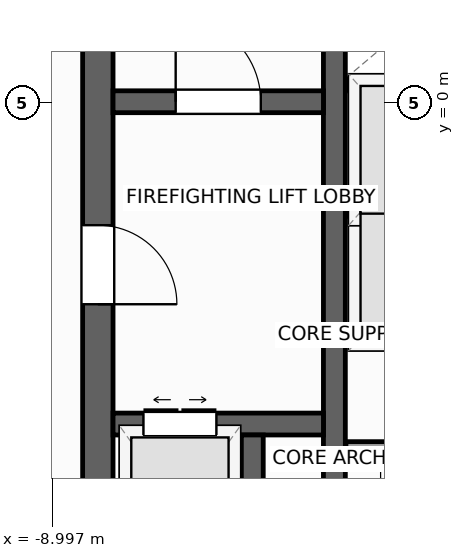
"""IFC4 building model, lengths in metres.
Left out: names, types, materials, properties, quantities, classifications, styles, units other than length and angle.
Written with IfcOpenShell. Run it as: python <this file> out.ifc"""

import sys

from ifc_helpers import new_model, si_unit, direction, frame, frame_2d, origin, place, context, subcontext, project, spatial, rectangle, extrude, source, transform, mapped, element, fill, save


model = new_model("IFC4")
c1 = context("Model", 3, precision=1e-05, world=origin(), true_north=direction((0.0, 1.0)))
c2 = subcontext(c1, "Body", "Model", "MODEL_VIEW")
j1 = project(units=[si_unit("LENGTHUNIT", "METRE"), si_unit("PLANEANGLEUNIT", "RADIAN")], contexts=[c1])
p1 = place(None, origin())
s1 = spatial("IfcSite", under=j1, at=p1, CompositionType="ELEMENT")
p2 = place(p1, origin())
s2 = spatial("IfcBuilding", under=s1, at=p2, CompositionType="ELEMENT")
p3 = place(p2, frame((0.0, 0.0, 221.2)))
s3 = spatial("IfcBuildingStorey", under=s2, at=p3, CompositionType="ELEMENT", Elevation=221.2)
p4 = place(p3, frame((-8.25, -8.0, 0.0), z_axis=(0.0, 0.0, 1.0), x_axis=(0.0, 1.0, 0.0)))
e1 = element("IfcWall", 1, at=p4, inside=s3, PredefinedType="SHEAR", context=c2, shape_type="SweptSolid", body=[
    extrude(rectangle(XDim=16.0, YDim=0.5, at=frame_2d((8.0, 0.0))), origin(), (0.0, 0.0, 1.0), 3.9),
])
p5 = place(p4, frame((4.69, 0.0, 0.0)))
e2 = element("IfcOpeningElement", 2, at=p5, cuts=e1, PredefinedType="OPENING", context=c2, shape_type="SweptSolid", body=[
    extrude(rectangle(XDim=1.3, YDim=2.2, at=frame_2d((0.65, 1.1))), frame((0.0, 0.26, 0.0), z_axis=(0.0, -1.0, 0.0), x_axis=(1.0, 0.0, 0.0)), (0.0, 0.0, 1.0), 0.52),
])
p6 = place(p3, frame((-4.36, -8.0, 0.0), z_axis=(0.0, 0.0, 1.0), x_axis=(0.0, 1.0, 0.0)))
e3 = element("IfcWall", 3, at=p6, inside=s3, PredefinedType="SHEAR", context=c2, shape_type="SweptSolid", body=[
    extrude(rectangle(XDim=16.0, YDim=0.36, at=frame_2d((8.0, 0.0))), origin(), (0.0, 0.0, 1.0), 3.9),
])
p7 = place(p3, frame((-8.0, 0.02, 0.0), z_axis=(0.0, 0.0, 1.0), x_axis=(1.0, 0.0, 0.0)))
e4 = element("IfcWall", 4, at=p7, inside=s3, PredefinedType="SHEAR", context=c2, shape_type="SweptSolid", body=[
    extrude(rectangle(XDim=3.46, YDim=0.36, at=frame_2d((1.73, 0.0))), origin(), (0.0, 0.0, 1.0), 3.9),
])
p8 = place(p7, frame((1.03, 0.0, 0.0)))
e5 = element("IfcOpeningElement", 5, at=p8, cuts=e4, PredefinedType="OPENING", context=c2, shape_type="SweptSolid", body=[
    extrude(rectangle(XDim=1.4, YDim=2.2, at=frame_2d((0.7, 1.1))), frame((0.0, 0.19, 0.0), z_axis=(0.0, -1.0, 0.0), x_axis=(1.0, 0.0, 0.0)), (0.0, 0.0, 1.0), 0.38),
])
p9 = place(p3, frame((-8.0, -5.28, 0.0), z_axis=(0.0, 0.0, 1.0), x_axis=(1.0, 0.0, 0.0)))
e6 = element("IfcWall", 6, at=p9, inside=s3, PredefinedType="SHEAR", context=c2, shape_type="SweptSolid", body=[
    extrude(rectangle(XDim=3.46, YDim=0.36, at=frame_2d((1.73, 0.0))), origin(), (0.0, 0.0, 1.0), 3.9),
])
p10 = place(p9, frame((0.5, 0.0, 0.0)))
e7 = element("IfcOpeningElement", 7, at=p10, cuts=e6, PredefinedType="OPENING", context=c2, shape_type="SweptSolid", body=[
    extrude(rectangle(XDim=1.2, YDim=2.25, at=frame_2d((0.6, 1.125))), frame((0.0, 0.19, 0.0), z_axis=(0.0, -1.0, 0.0), x_axis=(1.0, 0.0, 0.0)), (0.0, 0.0, 1.0), 0.38),
])
p11 = place(p3, frame((-5.71, -8.0, 0.0), z_axis=(0.0, 0.0, 1.0), x_axis=(0.0, 1.0, 0.0)))
e8 = element("IfcWall", 8, at=p11, inside=s3, PredefinedType="SHEAR", context=c2, shape_type="SweptSolid", body=[
    extrude(rectangle(XDim=2.54, YDim=0.36, at=frame_2d((1.27, 0.0))), origin(), (0.0, 0.0, 1.0), 3.9),
])
p12 = place(p3, frame((-6.733, 29.154, 0.0), z_axis=(0.0, 0.0, 1.0), x_axis=(-0.629325378072, -0.77714192302, 0.0)))
e9 = element("IfcWall", 9, at=p12, inside=s3, PredefinedType="STANDARD", context=c2, shape_type="SweptSolid", body=[
    extrude(rectangle(XDim=36.84, YDim=0.34, at=frame_2d((18.42, 0.0))), origin(), (0.0, 0.0, 1.0), 2.96),
])
p13 = place(p12, frame((23.495, 0.0, 0.0)))
e10 = element("IfcOpeningElement", 10, at=p13, cuts=e9, PredefinedType="OPENING", context=c2, shape_type="SweptSolid", body=[
    extrude(rectangle(XDim=1.05, YDim=2.25, at=frame_2d((0.525, 1.125))), frame((0.0, 0.18, 0.0), z_axis=(0.0, -1.0, 0.0), x_axis=(1.0, 0.0, 0.0)), (0.0, 0.0, 1.0), 0.36),
])
p14 = place(p12, frame((3.721, 0.0, 0.48)))
e11 = element("IfcOpeningElement", 11, at=p14, cuts=e9, PredefinedType="OPENING", context=c2, shape_type="SweptSolid", body=[
    extrude(rectangle(XDim=1.4, YDim=2.4, at=frame_2d((0.7, 1.2))), frame((0.0, 0.18, 0.0), z_axis=(0.0, -1.0, 0.0), x_axis=(1.0, 0.0, 0.0)), (0.0, 0.0, 1.0), 0.36),
])
p15 = place(p12, frame((9.809, 0.0, 0.58)))
e12 = element("IfcOpeningElement", 12, at=p15, cuts=e9, PredefinedType="OPENING", context=c2, shape_type="SweptSolid", body=[
    extrude(rectangle(XDim=1.75, YDim=2.3, at=frame_2d((0.875, 1.15))), frame((0.0, 0.18, 0.0), z_axis=(0.0, -1.0, 0.0), x_axis=(1.0, 0.0, 0.0)), (0.0, 0.0, 1.0), 0.36),
])
p16 = place(p12, frame((16.058, 0.0, 0.58)))
e13 = element("IfcOpeningElement", 13, at=p16, cuts=e9, PredefinedType="OPENING", context=c2, shape_type="SweptSolid", body=[
    extrude(rectangle(XDim=1.75, YDim=2.3, at=frame_2d((0.875, 1.15))), frame((0.0, 0.18, 0.0), z_axis=(0.0, -1.0, 0.0), x_axis=(1.0, 0.0, 0.0)), (0.0, 0.0, 1.0), 0.36),
])
p17 = place(p12, frame((25.676, 0.0, 0.58)))
e14 = element("IfcOpeningElement", 14, at=p17, cuts=e9, PredefinedType="OPENING", context=c2, shape_type="SweptSolid", body=[
    extrude(rectangle(XDim=1.75, YDim=2.3, at=frame_2d((0.875, 1.15))), frame((0.0, 0.18, 0.0), z_axis=(0.0, -1.0, 0.0), x_axis=(1.0, 0.0, 0.0)), (0.0, 0.0, 1.0), 0.36),
])
p18 = place(p12, frame((30.232, 0.0, 0.48)))
e15 = element("IfcOpeningElement", 15, at=p18, cuts=e9, PredefinedType="OPENING", context=c2, shape_type="SweptSolid", body=[
    extrude(rectangle(XDim=1.4, YDim=2.4, at=frame_2d((0.7, 1.2))), frame((0.0, 0.18, 0.0), z_axis=(0.0, -1.0, 0.0), x_axis=(1.0, 0.0, 0.0)), (0.0, 0.0, 1.0), 0.36),
])
for number, where, z_axis, x_axis in (
    (16, (-4.17, -3.9, 0.0), (0.0, 0.0, 1.0), (1.0, 0.0, 0.0)),
    (17, (-4.17, 0.3, 0.0), (0.0, 0.0, 1.0), (1.0, 0.0, 0.0)),
):
    element("IfcWall", number, at=place(p3, frame(where, z_axis=z_axis, x_axis=x_axis)), inside=s3, PredefinedType="PARTITIONING", context=c2, shape_type="SweptSolid", body=[
        extrude(rectangle(XDim=2.28, YDim=0.18, at=frame_2d((1.14, 0.0))), origin(), (0.0, 0.0, 1.0), 3.66),
    ])
p19 = place(p3, frame((-4.16, -1.8, 0.0), z_axis=(0.0, 0.0, 1.0), x_axis=(1.0, 0.0, 0.0)))
e18 = element("IfcWall", 18, at=p19, inside=s3, PredefinedType="PARTITIONING", context=c2, shape_type="SweptSolid", body=[
    extrude(rectangle(XDim=2.26, YDim=0.12, at=frame_2d((1.13, 0.0))), origin(), (0.0, 0.0, 1.0), 3.66),
])
p20 = place(p3, frame((-4.17, -5.65, 0.0), z_axis=(0.0, 0.0, 1.0), x_axis=(1.0, 0.0, 0.0)))
e19 = element("IfcWall", 19, at=p20, inside=s3, PredefinedType="PARTITIONING", context=c2, shape_type="SweptSolid", body=[
    extrude(rectangle(XDim=2.28, YDim=0.16, at=frame_2d((1.14, 0.0))), origin(), (0.0, 0.0, 1.0), 3.66),
])
m1 = source(origin(), c2, "Body", "SweptSolid", [
    extrude(rectangle(XDim=1.4, YDim=2.2, at=frame_2d((0.7, 1.1))), frame((0.0, 0.025, 0.0), z_axis=(0.0, -1.0, 0.0), x_axis=(1.0, 0.0, 0.0)), (0.0, 0.0, 1.0), 0.05),
])
p21 = place(p8, origin())
e20 = element("IfcDoor", 20, at=p21, inside=s3, OperationType="SINGLE_SWING_LEFT", PredefinedType="DOOR", context=c2, shape_type="MappedRepresentation", body=[
    mapped(m1, transform((0.0, 0.0, 0.0), scale=1.0)),
])
fill(e5, e20)
m2 = source(origin(), c2, "Body", "SweptSolid", [
    extrude(rectangle(XDim=1.3, YDim=2.2, at=frame_2d((0.65, 1.1))), frame((0.0, 0.025, 0.0), z_axis=(0.0, -1.0, 0.0), x_axis=(1.0, 0.0, 0.0)), (0.0, 0.0, 1.0), 0.05),
])
p22 = place(p5, frame((1.3, 0.0, 0.0), z_axis=(0.0, 0.0, 1.0), x_axis=(-1.0, 0.0, 0.0)))
e21 = element("IfcDoor", 21, at=p22, inside=s3, OperationType="SINGLE_SWING_LEFT", PredefinedType="DOOR", context=c2, shape_type="MappedRepresentation", body=[
    mapped(m2, transform((0.0, 0.0, 0.0), scale=1.0)),
])
fill(e2, e21)
m3 = source(origin(), c2, "Body", "SweptSolid", [
    extrude(rectangle(XDim=1.2, YDim=2.25, at=frame_2d((0.6, 1.125))), frame((0.0, 0.025, 0.0), z_axis=(0.0, -1.0, 0.0), x_axis=(1.0, 0.0, 0.0)), (0.0, 0.0, 1.0), 0.05),
])
p23 = place(p10, origin())
e22 = element("IfcDoor", 22, at=p23, inside=s3, OperationType="DOUBLE_DOOR_SLIDING", PredefinedType="DOOR", context=c2, shape_type="MappedRepresentation", body=[
    mapped(m3, transform((0.0, 0.0, 0.0), scale=1.0)),
])
fill(e7, e22)
save(model, sys.argv[1])
